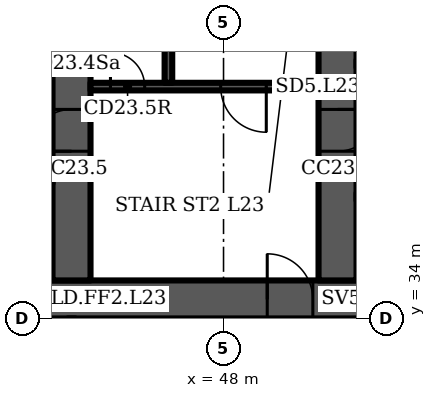
"""IFC4 building model, lengths in metres.
Left out: names, types, materials, properties, quantities, classifications, styles, units other than length and angle.
Written with IfcOpenShell. Run it as: python <this file> out.ifc"""

import sys

from ifc_helpers import new_model, si_unit, direction, frame, frame_2d, origin, place, context, subcontext, project, spatial, rectangle, extrude, element, fill, save


model = new_model("IFC4")
c1 = context("Model", 3, precision=1e-05, world=origin(), true_north=direction((0.0, 1.0)))
c2 = subcontext(c1, "Body", "Model", "MODEL_VIEW")
j1 = project(units=[si_unit("LENGTHUNIT", "METRE"), si_unit("PLANEANGLEUNIT", "RADIAN")], contexts=[c1])
p1 = place(None, origin())
s1 = spatial("IfcSite", under=j1, at=p1, CompositionType="ELEMENT")
p2 = place(p1, origin())
s2 = spatial("IfcBuilding", under=s1, at=p2, CompositionType="ELEMENT")
p3 = place(p2, frame((0.0, 0.0, 103.9)))
s3 = spatial("IfcBuildingStorey", under=s2, at=p3, CompositionType="ELEMENT", Elevation=103.9)
p4 = place(p3, frame((16.0, 34.5, 0.0), z_axis=(0.0, 0.0, 1.0), x_axis=(1.0, 0.0, 0.0)))
e1 = element("IfcWall", 1, at=p4, inside=s3, PredefinedType="SHEAR", context=c2, shape_type="SweptSolid", body=[
    extrude(rectangle(XDim=49.0, YDim=1.0, at=frame_2d((24.5, 0.0))), origin(), (0.0, 0.0, 1.0), 3.6),
])
p5 = place(p4, frame((1.2, 0.0, 0.0)))
e2 = element("IfcOpeningElement", 2, at=p5, cuts=e1, PredefinedType="OPENING", context=c2, shape_type="SweptSolid", body=[
    extrude(rectangle(XDim=1.1, YDim=2.1, at=frame_2d((0.55, 1.05))), frame((0.0, 0.51, 0.0), z_axis=(0.0, -1.0, 0.0), x_axis=(1.0, 0.0, 0.0)), (0.0, 0.0, 1.0), 1.02),
])
p6 = place(p4, frame((5.083, 0.0, 0.0)))
e3 = element("IfcOpeningElement", 3, at=p6, cuts=e1, PredefinedType="OPENING", context=c2, shape_type="SweptSolid", body=[
    extrude(rectangle(XDim=1.1, YDim=2.1, at=frame_2d((0.55, 1.05))), frame((0.0, 0.51, 0.0), z_axis=(0.0, -1.0, 0.0), x_axis=(1.0, 0.0, 0.0)), (0.0, 0.0, 1.0), 1.02),
])
p7 = place(p4, frame((2.933, 0.0, 0.0)))
e4 = element("IfcOpeningElement", 4, at=p7, cuts=e1, PredefinedType="OPENING", context=c2, shape_type="SweptSolid", body=[
    extrude(rectangle(XDim=1.4, YDim=2.1, at=frame_2d((0.7, 1.05))), frame((0.0, 0.51, 0.0), z_axis=(0.0, -1.0, 0.0), x_axis=(1.0, 0.0, 0.0)), (0.0, 0.0, 1.0), 1.02),
])
p8 = place(p4, frame((7.65, 0.0, 0.0)))
e5 = element("IfcOpeningElement", 5, at=p8, cuts=e1, PredefinedType="OPENING", context=c2, shape_type="SweptSolid", body=[
    extrude(rectangle(XDim=1.2, YDim=2.1, at=frame_2d((0.6, 1.05))), frame((0.0, 0.51, 0.0), z_axis=(0.0, -1.0, 0.0), x_axis=(1.0, 0.0, 0.0)), (0.0, 0.0, 1.0), 1.02),
])
p9 = place(p4, frame((14.817, 0.0, 0.0)))
e6 = element("IfcOpeningElement", 6, at=p9, cuts=e1, PredefinedType="OPENING", context=c2, shape_type="SweptSolid", body=[
    extrude(rectangle(XDim=1.1, YDim=2.1, at=frame_2d((0.55, 1.05))), frame((0.0, 0.51, 0.0), z_axis=(0.0, -1.0, 0.0), x_axis=(1.0, 0.0, 0.0)), (0.0, 0.0, 1.0), 1.02),
])
p10 = place(p4, frame((19.083, 0.0, 0.0)))
e7 = element("IfcOpeningElement", 7, at=p10, cuts=e1, PredefinedType="OPENING", context=c2, shape_type="SweptSolid", body=[
    extrude(rectangle(XDim=1.1, YDim=2.1, at=frame_2d((0.55, 1.05))), frame((0.0, 0.51, 0.0), z_axis=(0.0, -1.0, 0.0), x_axis=(1.0, 0.0, 0.0)), (0.0, 0.0, 1.0), 1.02),
])
p11 = place(p4, frame((16.8, 0.0, 0.0)))
e8 = element("IfcOpeningElement", 8, at=p11, cuts=e1, PredefinedType="OPENING", context=c2, shape_type="SweptSolid", body=[
    extrude(rectangle(XDim=1.4, YDim=2.1, at=frame_2d((0.7, 1.05))), frame((0.0, 0.51, 0.0), z_axis=(0.0, -1.0, 0.0), x_axis=(1.0, 0.0, 0.0)), (0.0, 0.0, 1.0), 1.02),
])
p12 = place(p4, frame((21.817, 0.0, 0.0)))
e9 = element("IfcOpeningElement", 9, at=p12, cuts=e1, PredefinedType="OPENING", context=c2, shape_type="SweptSolid", body=[
    extrude(rectangle(XDim=1.1, YDim=2.1, at=frame_2d((0.55, 1.05))), frame((0.0, 0.51, 0.0), z_axis=(0.0, -1.0, 0.0), x_axis=(1.0, 0.0, 0.0)), (0.0, 0.0, 1.0), 1.02),
])
p13 = place(p4, frame((26.083, 0.0, 0.0)))
e10 = element("IfcOpeningElement", 10, at=p13, cuts=e1, PredefinedType="OPENING", context=c2, shape_type="SweptSolid", body=[
    extrude(rectangle(XDim=1.1, YDim=2.1, at=frame_2d((0.55, 1.05))), frame((0.0, 0.51, 0.0), z_axis=(0.0, -1.0, 0.0), x_axis=(1.0, 0.0, 0.0)), (0.0, 0.0, 1.0), 1.02),
])
p14 = place(p4, frame((33.15, 0.0, 0.0)))
e11 = element("IfcOpeningElement", 11, at=p14, cuts=e1, PredefinedType="OPENING", context=c2, shape_type="SweptSolid", body=[
    extrude(rectangle(XDim=1.2, YDim=2.1, at=frame_2d((0.6, 1.05))), frame((0.0, 0.51, 0.0), z_axis=(0.0, -1.0, 0.0), x_axis=(1.0, 0.0, 0.0)), (0.0, 0.0, 1.0), 1.02),
])
p15 = place(p4, frame((37.8, 0.0, 0.0)))
e12 = element("IfcOpeningElement", 12, at=p15, cuts=e1, PredefinedType="OPENING", context=c2, shape_type="SweptSolid", body=[
    extrude(rectangle(XDim=1.4, YDim=2.1, at=frame_2d((0.7, 1.05))), frame((0.0, 0.51, 0.0), z_axis=(0.0, -1.0, 0.0), x_axis=(1.0, 0.0, 0.0)), (0.0, 0.0, 1.0), 1.02),
])
p16 = place(p4, frame((42.817, 0.0, 0.0)))
e13 = element("IfcOpeningElement", 13, at=p16, cuts=e1, PredefinedType="OPENING", context=c2, shape_type="SweptSolid", body=[
    extrude(rectangle(XDim=1.1, YDim=2.1, at=frame_2d((0.55, 1.05))), frame((0.0, 0.51, 0.0), z_axis=(0.0, -1.0, 0.0), x_axis=(1.0, 0.0, 0.0)), (0.0, 0.0, 1.0), 1.02),
])
p17 = place(p4, frame((46.7, 0.0, 0.0)))
e14 = element("IfcOpeningElement", 14, at=p17, cuts=e1, PredefinedType="OPENING", context=c2, shape_type="SweptSolid", body=[
    extrude(rectangle(XDim=1.1, YDim=2.1, at=frame_2d((0.55, 1.05))), frame((0.0, 0.51, 0.0), z_axis=(0.0, -1.0, 0.0), x_axis=(1.0, 0.0, 0.0)), (0.0, 0.0, 1.0), 1.02),
])
p18 = place(p4, frame((44.667, 0.0, 0.0)))
e15 = element("IfcOpeningElement", 15, at=p18, cuts=e1, PredefinedType="OPENING", context=c2, shape_type="SweptSolid", body=[
    extrude(rectangle(XDim=1.4, YDim=2.1, at=frame_2d((0.7, 1.05))), frame((0.0, 0.51, 0.0), z_axis=(0.0, -1.0, 0.0), x_axis=(1.0, 0.0, 0.0)), (0.0, 0.0, 1.0), 1.02),
])
p19 = place(p3, frame((44.0, 35.0, 0.0), z_axis=(0.0, 0.0, 1.0), x_axis=(0.0, 1.0, 0.0)))
e16 = element("IfcWall", 16, at=p19, inside=s3, PredefinedType="SHEAR", context=c2, shape_type="SweptSolid", body=[
    extrude(rectangle(XDim=14.577, YDim=1.0, at=frame_2d((7.289, 0.0))), origin(), (0.0, 0.0, 1.0), 3.6),
])
p20 = place(p19, frame((3.4, 0.0, 0.0)))
e17 = element("IfcOpeningElement", 17, at=p20, cuts=e16, PredefinedType="OPENING", context=c2, shape_type="SweptSolid", body=[
    extrude(rectangle(XDim=1.1, YDim=2.1, at=frame_2d((0.55, 1.05))), frame((0.0, 0.51, 0.0), z_axis=(0.0, -1.0, 0.0), x_axis=(1.0, 0.0, 0.0)), (0.0, 0.0, 1.0), 1.02),
])
p21 = place(p19, frame((9.8, 0.0, 0.0)))
e18 = element("IfcOpeningElement", 18, at=p21, cuts=e16, PredefinedType="OPENING", context=c2, shape_type="SweptSolid", body=[
    extrude(rectangle(XDim=1.0, YDim=2.1, at=frame_2d((0.5, 1.05))), frame((0.0, 0.51, 0.0), z_axis=(0.0, -1.0, 0.0), x_axis=(1.0, 0.0, 0.0)), (0.0, 0.0, 1.0), 1.02),
])
p22 = place(p3, frame((51.0, 35.0, 0.0), z_axis=(0.0, 0.0, 1.0), x_axis=(0.0, 1.0, 0.0)))
e19 = element("IfcWall", 19, at=p22, inside=s3, PredefinedType="SHEAR", context=c2, shape_type="SweptSolid", body=[
    extrude(rectangle(XDim=13.965, YDim=1.0, at=frame_2d((6.982, 0.0))), origin(), (0.0, 0.0, 1.0), 3.6),
])
p23 = place(p22, frame((3.4, 0.0, 0.0)))
e20 = element("IfcOpeningElement", 20, at=p23, cuts=e19, PredefinedType="OPENING", context=c2, shape_type="SweptSolid", body=[
    extrude(rectangle(XDim=1.1, YDim=2.1, at=frame_2d((0.55, 1.05))), frame((0.0, 0.51, 0.0), z_axis=(0.0, -1.0, 0.0), x_axis=(1.0, 0.0, 0.0)), (0.0, 0.0, 1.0), 1.02),
])
p24 = place(p3, frame((44.5, 40.1, 0.0), z_axis=(0.0, 0.0, 1.0), x_axis=(1.0, 0.0, 0.0)))
e21 = element("IfcWall", 21, at=p24, inside=s3, PredefinedType="SHEAR", context=c2, shape_type="SweptSolid", body=[
    extrude(rectangle(XDim=6.0, YDim=0.2, at=frame_2d((3.0, 0.0))), origin(), (0.0, 0.0, 1.0), 3.2),
])
p25 = place(p24, frame((3.425, 0.0, 0.0)))
e22 = element("IfcOpeningElement", 22, at=p25, cuts=e21, PredefinedType="OPENING", context=c2, shape_type="SweptSolid", body=[
    extrude(rectangle(XDim=1.2, YDim=2.1, at=frame_2d((0.6, 1.05))), frame((0.0, 0.11, 0.0), z_axis=(0.0, -1.0, 0.0), x_axis=(1.0, 0.0, 0.0)), (0.0, 0.0, 1.0), 0.22),
])
p26 = place(p24, frame((0.525, 0.0, 0.0)))
e23 = element("IfcOpeningElement", 23, at=p26, cuts=e21, PredefinedType="OPENING", context=c2, shape_type="SweptSolid", body=[
    extrude(rectangle(XDim=0.9, YDim=2.1, at=frame_2d((0.45, 1.05))), frame((0.0, 0.11, 0.0), z_axis=(0.0, -1.0, 0.0), x_axis=(1.0, 0.0, 0.0)), (0.0, 0.0, 1.0), 0.22),
])
p27 = place(p3, frame((46.55, 40.2, 0.0), z_axis=(0.0, 0.0, 1.0), x_axis=(0.0, 1.0, 0.0)))
e24 = element("IfcWall", 24, at=p27, inside=s3, PredefinedType="SHEAR", context=c2, shape_type="SweptSolid", body=[
    extrude(rectangle(XDim=7.2, YDim=0.2, at=frame_2d((3.6, 0.0))), origin(), (0.0, 0.0, 1.0), 3.2),
])
p28 = place(p25, origin())
e25 = element("IfcDoor", 25, at=p28, inside=s3, OperationType="SINGLE_SWING_RIGHT", PredefinedType="DOOR", context=c2, shape_type="SweptSolid", body=[
    extrude(rectangle(XDim=1.2, YDim=2.1, at=frame_2d((0.6, 1.05))), frame((0.0, 0.025, 0.0), z_axis=(0.0, -1.0, 0.0), x_axis=(1.0, 0.0, 0.0)), (0.0, 0.0, 1.0), 0.05),
])
fill(e22, e25)
p29 = place(p26, origin())
e26 = element("IfcDoor", 26, at=p29, inside=s3, OperationType="SINGLE_SWING_LEFT", PredefinedType="DOOR", context=c2, shape_type="SweptSolid", body=[
    extrude(rectangle(XDim=0.9, YDim=2.1, at=frame_2d((0.45, 1.05))), frame((0.0, 0.025, 0.0), z_axis=(0.0, -1.0, 0.0), x_axis=(1.0, 0.0, 0.0)), (0.0, 0.0, 1.0), 0.05),
])
fill(e23, e26)
p30 = place(p14, origin())
e27 = element("IfcDoor", 27, at=p30, inside=s3, OperationType="SINGLE_SWING_LEFT", PredefinedType="DOOR", context=c2, shape_type="SweptSolid", body=[
    extrude(rectangle(XDim=1.2, YDim=2.1, at=frame_2d((0.6, 1.05))), frame((0.0, 0.025, 0.0), z_axis=(0.0, -1.0, 0.0), x_axis=(1.0, 0.0, 0.0)), (0.0, 0.0, 1.0), 0.05),
])
fill(e11, e27)
p31 = place(p20, origin())
e28 = element("IfcDoor", 28, at=p31, inside=s3, OperationType="SINGLE_SWING_LEFT", PredefinedType="DOOR", context=c2, shape_type="SweptSolid", body=[
    extrude(rectangle(XDim=1.1, YDim=2.1, at=frame_2d((0.55, 1.05))), frame((0.0, 0.025, 0.0), z_axis=(0.0, -1.0, 0.0), x_axis=(1.0, 0.0, 0.0)), (0.0, 0.0, 1.0), 0.05),
])
fill(e17, e28)
p32 = place(p23, origin())
e29 = element("IfcDoor", 29, at=p32, inside=s3, OperationType="SINGLE_SWING_RIGHT", PredefinedType="DOOR", context=c2, shape_type="SweptSolid", body=[
    extrude(rectangle(XDim=1.1, YDim=2.1, at=frame_2d((0.55, 1.05))), frame((0.0, 0.025, 0.0), z_axis=(0.0, -1.0, 0.0), x_axis=(1.0, 0.0, 0.0)), (0.0, 0.0, 1.0), 0.05),
])
fill(e20, e29)
save(model, sys.argv[1])
